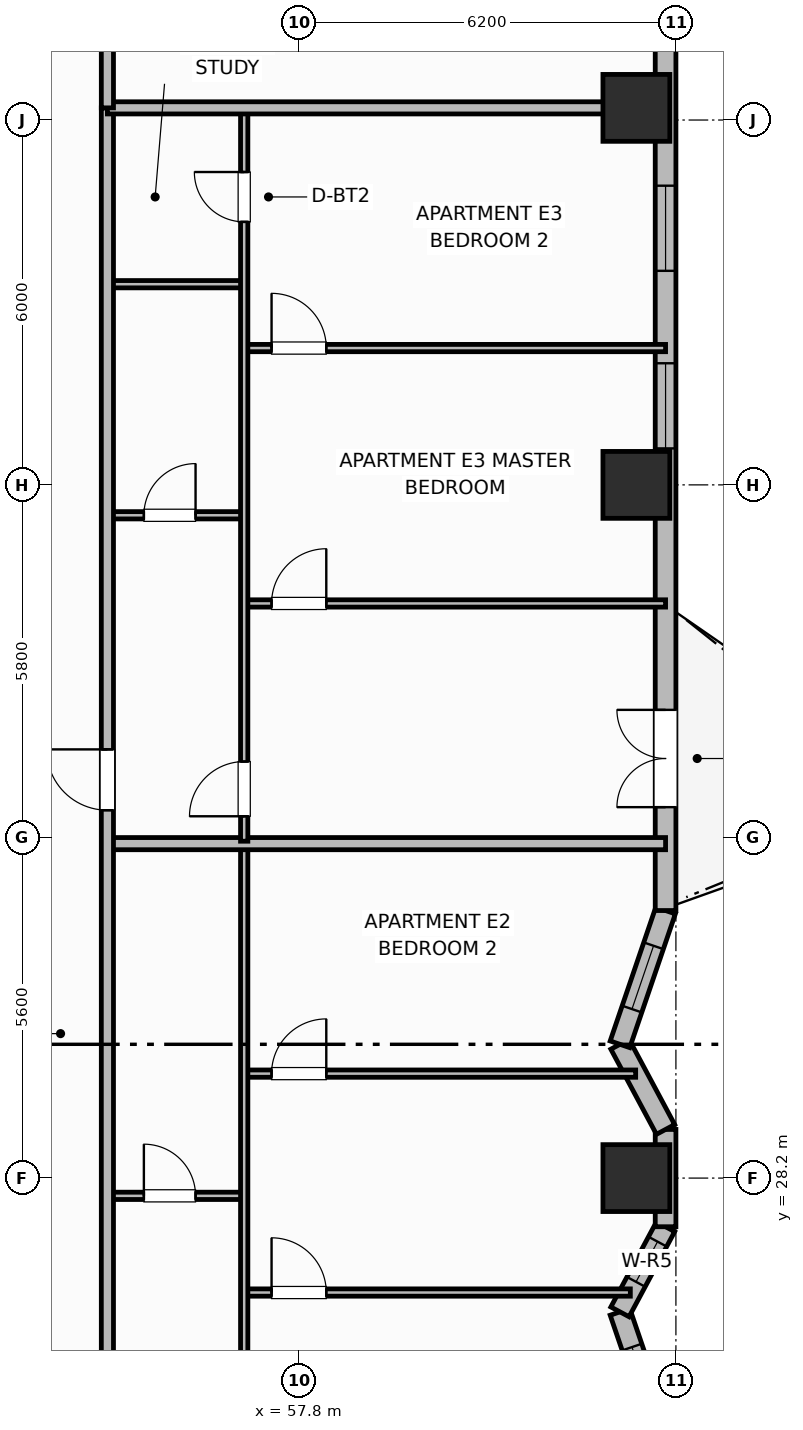
"""IFC4 building model, lengths in metres.
Left out: names, types, materials, properties, quantities, classifications, styles, units other than length and angle.
Written with IfcOpenShell. Run it as: python <this file> out.ifc"""

import sys

from ifc_helpers import new_model, si_unit, direction, frame, frame_2d, origin, origin_2d, place, context, subcontext, project, spatial, rectangle, extrude, element, fill, save


model = new_model("IFC4")
c1 = context("Model", 3, precision=1e-05, world=origin(), true_north=direction((0.0, 1.0)))
c2 = subcontext(c1, "Body", "Model", "MODEL_VIEW")
j1 = project(units=[si_unit("LENGTHUNIT", "METRE"), si_unit("PLANEANGLEUNIT", "RADIAN")], contexts=[c1])
p1 = place(None, origin())
s1 = spatial("IfcSite", under=j1, at=p1, CompositionType="ELEMENT")
p2 = place(p1, origin())
s2 = spatial("IfcBuilding", under=s1, at=p2, CompositionType="ELEMENT")
p3 = place(p2, frame((0.0, 0.0, 121.6)))
s3 = spatial("IfcBuildingStorey", under=s2, at=p3, CompositionType="ELEMENT", Elevation=121.6)
for number, where, z_axis, x_axis in (
    (1, (63.35, 28.2, 0.0), (0.0, 0.0, 1.0), (1.0, 0.0, 0.0)),
    (2, (63.35, 39.6, 0.0), (0.0, 0.0, 1.0), (1.0, 0.0, 0.0)),
    (3, (63.35, 45.8, 0.0), (0.0, 0.0, 1.0), (1.0, 0.0, 0.0)),
):
    element("IfcColumn", number, at=place(p3, frame(where, z_axis=z_axis, x_axis=x_axis)), inside=s3, PredefinedType="COLUMN", context=c2, shape_type="SweptSolid", body=[
        extrude(rectangle(XDim=1.1, YDim=1.1, at=origin_2d()), origin(), (0.0, 0.0, 1.0), 3.7),
    ])
p4 = place(p3, frame((63.83, 23.8, 0.0), z_axis=(0.0, 0.0, 1.0), x_axis=(-0.322680343871, 0.946508000853, 0.0)))
e4 = element("IfcWall", 4, at=p4, inside=s3, PredefinedType="SOLIDWALL", context=c2, shape_type="SweptSolid", body=[
    extrude(rectangle(XDim=2.324, YDim=0.34, at=frame_2d((1.162, 0.0))), origin(), (0.0, 0.0, 1.0), 2.7),
])
p5 = place(p4, frame((0.612, 0.0, 0.89)))
e5 = element("IfcOpeningElement", 5, at=p5, cuts=e4, PredefinedType="OPENING", context=c2, shape_type="SweptSolid", body=[
    extrude(rectangle(XDim=1.1, YDim=1.65, at=frame_2d((0.55, 0.825))), frame((0.0, 0.18, 0.0), z_axis=(0.0, -1.0, 0.0), x_axis=(1.0, 0.0, 0.0)), (0.0, 0.0, 1.0), 0.36),
])
p6 = place(p3, frame((63.08, 26.0, 0.0), z_axis=(0.0, 0.0, 1.0), x_axis=(0.472247007964, 0.881466257703, 0.0)))
e6 = element("IfcWall", 6, at=p6, inside=s3, PredefinedType="SOLIDWALL", context=c2, shape_type="SweptSolid", body=[
    extrude(rectangle(XDim=1.588, YDim=0.34, at=frame_2d((0.794, 0.0))), origin(), (0.0, 0.0, 1.0), 2.7),
])
p7 = place(p6, frame((0.56, 0.0, 0.89)))
e7 = element("IfcOpeningElement", 7, at=p7, cuts=e6, PredefinedType="OPENING", context=c2, shape_type="SweptSolid", body=[
    extrude(rectangle(XDim=0.75, YDim=1.65, at=frame_2d((0.375, 0.825))), frame((0.0, 0.18, 0.0), z_axis=(0.0, -1.0, 0.0), x_axis=(1.0, 0.0, 0.0)), (0.0, 0.0, 1.0), 0.36),
])
p8 = place(p3, frame((63.83, 27.4, 0.0), z_axis=(0.0, 0.0, 1.0), x_axis=(0.0, 1.0, 0.0)))
e8 = element("IfcWall", 8, at=p8, inside=s3, PredefinedType="SOLIDWALL", context=c2, shape_type="SweptSolid", body=[
    extrude(rectangle(XDim=1.6, YDim=0.34, at=frame_2d((0.8, 0.0))), origin(), (0.0, 0.0, 1.0), 2.7),
])
p9 = place(p3, frame((63.83, 29.0, 0.0), z_axis=(0.0, 0.0, 1.0), x_axis=(-0.472247007964, 0.881466257703, 0.0)))
e9 = element("IfcWall", 9, at=p9, inside=s3, PredefinedType="SOLIDWALL", context=c2, shape_type="SweptSolid", body=[
    extrude(rectangle(XDim=1.588, YDim=0.34, at=frame_2d((0.794, 0.0))), origin(), (0.0, 0.0, 1.0), 2.7),
])
p10 = place(p3, frame((63.08, 30.4, 0.0), z_axis=(0.0, 0.0, 1.0), x_axis=(0.32264826586, 0.946518936175, 0.0)))
e10 = element("IfcWall", 10, at=p10, inside=s3, PredefinedType="SOLIDWALL", context=c2, shape_type="SweptSolid", body=[
    extrude(rectangle(XDim=2.324, YDim=0.34, at=frame_2d((1.162, 0.0))), origin(), (0.0, 0.0, 1.0), 2.7),
])
p11 = place(p10, frame((0.612, 0.0, 0.89)))
e11 = element("IfcOpeningElement", 11, at=p11, cuts=e10, PredefinedType="OPENING", context=c2, shape_type="SweptSolid", body=[
    extrude(rectangle(XDim=1.1, YDim=1.65, at=frame_2d((0.55, 0.825))), frame((0.0, 0.18, 0.0), z_axis=(0.0, -1.0, 0.0), x_axis=(1.0, 0.0, 0.0)), (0.0, 0.0, 1.0), 0.36),
])
p12 = place(p3, frame((63.83, 32.6, 0.0), z_axis=(0.0, 0.0, 1.0), x_axis=(0.0, 1.0, 0.0)))
e12 = element("IfcWall", 12, at=p12, inside=s3, PredefinedType="SOLIDWALL", context=c2, shape_type="SweptSolid", body=[
    extrude(rectangle(XDim=14.8, YDim=0.34, at=frame_2d((7.4, 0.0))), origin(), (0.0, 0.0, 1.0), 2.7),
])
p13 = place(p12, frame((1.7, 0.0, 0.0)))
e13 = element("IfcOpeningElement", 13, at=p13, cuts=e12, PredefinedType="OPENING", context=c2, shape_type="SweptSolid", body=[
    extrude(rectangle(XDim=1.6, YDim=2.1, at=frame_2d((0.8, 1.05))), frame((0.0, 0.18, 0.0), z_axis=(0.0, -1.0, 0.0), x_axis=(1.0, 0.0, 0.0)), (0.0, 0.0, 1.0), 0.36),
])
p14 = place(p12, frame((7.6, 0.0, 0.69)))
e14 = element("IfcOpeningElement", 14, at=p14, cuts=e12, PredefinedType="OPENING", context=c2, shape_type="SweptSolid", body=[
    extrude(rectangle(XDim=1.4, YDim=1.85, at=frame_2d((0.7, 0.925))), frame((0.0, 0.18, 0.0), z_axis=(0.0, -1.0, 0.0), x_axis=(1.0, 0.0, 0.0)), (0.0, 0.0, 1.0), 0.36),
])
p15 = place(p12, frame((10.52, 0.0, 0.69)))
e15 = element("IfcOpeningElement", 15, at=p15, cuts=e12, PredefinedType="OPENING", context=c2, shape_type="SweptSolid", body=[
    extrude(rectangle(XDim=1.4, YDim=1.85, at=frame_2d((0.7, 0.925))), frame((0.0, 0.18, 0.0), z_axis=(0.0, -1.0, 0.0), x_axis=(1.0, 0.0, 0.0)), (0.0, 0.0, 1.0), 0.36),
])
p16 = place(p3, frame((54.65, 27.908, 0.0), z_axis=(0.0, 0.0, 1.0), x_axis=(1.0, 0.0, 0.0)))
e16 = element("IfcWall", 16, at=p16, inside=s3, PredefinedType="PARTITIONING", context=c2, shape_type="SweptSolid", body=[
    extrude(rectangle(XDim=2.25, YDim=0.12, at=frame_2d((1.125, 0.0))), origin(), (0.0, 0.0, 1.0), 2.53),
])
p17 = place(p16, frame((0.6, 0.0, 0.0)))
e17 = element("IfcOpeningElement", 17, at=p17, cuts=e16, PredefinedType="OPENING", context=c2, shape_type="SweptSolid", body=[
    extrude(rectangle(XDim=0.85, YDim=2.1, at=frame_2d((0.425, 1.05))), frame((0.0, 0.07, 0.0), z_axis=(0.0, -1.0, 0.0), x_axis=(1.0, 0.0, 0.0)), (0.0, 0.0, 1.0), 0.14),
])
p18 = place(p3, frame((56.9, 26.318, 0.0), z_axis=(0.0, 0.0, 1.0), x_axis=(1.0, 0.0, 0.0)))
e18 = element("IfcWall", 18, at=p18, inside=s3, PredefinedType="PARTITIONING", context=c2, shape_type="SweptSolid", body=[
    extrude(rectangle(XDim=6.351, YDim=0.12, at=frame_2d((3.175, 0.0))), origin(), (0.0, 0.0, 1.0), 2.53),
])
p19 = place(p18, frame((0.45, 0.0, 0.0)))
e19 = element("IfcOpeningElement", 19, at=p19, cuts=e18, PredefinedType="OPENING", context=c2, shape_type="SweptSolid", body=[
    extrude(rectangle(XDim=0.9, YDim=2.1, at=frame_2d((0.45, 1.05))), frame((0.0, 0.07, 0.0), z_axis=(0.0, -1.0, 0.0), x_axis=(1.0, 0.0, 0.0)), (0.0, 0.0, 1.0), 0.14),
])
p20 = place(p3, frame((56.9, 29.918, 0.0), z_axis=(0.0, 0.0, 1.0), x_axis=(1.0, 0.0, 0.0)))
e20 = element("IfcWall", 20, at=p20, inside=s3, PredefinedType="PARTITIONING", context=c2, shape_type="SweptSolid", body=[
    extrude(rectangle(XDim=6.438, YDim=0.12, at=frame_2d((3.219, 0.0))), origin(), (0.0, 0.0, 1.0), 2.53),
])
p21 = place(p20, frame((0.45, 0.0, 0.0)))
e21 = element("IfcOpeningElement", 21, at=p21, cuts=e20, PredefinedType="OPENING", context=c2, shape_type="SweptSolid", body=[
    extrude(rectangle(XDim=0.9, YDim=2.1, at=frame_2d((0.45, 1.05))), frame((0.0, 0.07, 0.0), z_axis=(0.0, -1.0, 0.0), x_axis=(1.0, 0.0, 0.0)), (0.0, 0.0, 1.0), 0.14),
])
p22 = place(p3, frame((56.9, 22.608, 0.0), z_axis=(0.0, 0.0, 1.0), x_axis=(0.0, 1.0, 0.0)))
e22 = element("IfcWall", 22, at=p22, inside=s3, PredefinedType="PARTITIONING", context=c2, shape_type="SweptSolid", body=[
    extrude(rectangle(XDim=11.052, YDim=0.12, at=frame_2d((5.526, 0.0))), origin(), (0.0, 0.0, 1.0), 2.53),
])
p23 = place(p22, frame((0.41, 0.0, 0.0)))
e23 = element("IfcOpeningElement", 23, at=p23, cuts=e22, PredefinedType="OPENING", context=c2, shape_type="SweptSolid", body=[
    extrude(rectangle(XDim=0.9, YDim=2.1, at=frame_2d((0.45, 1.05))), frame((0.0, 0.07, 0.0), z_axis=(0.0, -1.0, 0.0), x_axis=(1.0, 0.0, 0.0)), (0.0, 0.0, 1.0), 0.14),
])
p24 = place(p3, frame((54.65, 33.7, 0.0), z_axis=(0.0, 0.0, 1.0), x_axis=(1.0, 0.0, 0.0)))
e24 = element("IfcWall", 24, at=p24, inside=s3, PredefinedType="PARTITIONING", context=c2, shape_type="SweptSolid", body=[
    extrude(rectangle(XDim=9.18, YDim=0.2, at=frame_2d((4.59, 0.0))), origin(), (0.0, 0.0, 1.0), 2.53),
])
p25 = place(p3, frame((54.65, 39.1, 0.0), z_axis=(0.0, 0.0, 1.0), x_axis=(1.0, 0.0, 0.0)))
e25 = element("IfcWall", 25, at=p25, inside=s3, PredefinedType="PARTITIONING", context=c2, shape_type="SweptSolid", body=[
    extrude(rectangle(XDim=2.25, YDim=0.12, at=frame_2d((1.125, 0.0))), origin(), (0.0, 0.0, 1.0), 2.53),
])
p26 = place(p25, frame((0.6, 0.0, 0.0)))
e26 = element("IfcOpeningElement", 26, at=p26, cuts=e25, PredefinedType="OPENING", context=c2, shape_type="SweptSolid", body=[
    extrude(rectangle(XDim=0.85, YDim=2.1, at=frame_2d((0.425, 1.05))), frame((0.0, 0.07, 0.0), z_axis=(0.0, -1.0, 0.0), x_axis=(1.0, 0.0, 0.0)), (0.0, 0.0, 1.0), 0.14),
])
p27 = place(p3, frame((54.65, 42.9, 0.0), z_axis=(0.0, 0.0, 1.0), x_axis=(1.0, 0.0, 0.0)))
e27 = element("IfcWall", 27, at=p27, inside=s3, PredefinedType="PARTITIONING", context=c2, shape_type="SweptSolid", body=[
    extrude(rectangle(XDim=2.25, YDim=0.12, at=frame_2d((1.125, 0.0))), origin(), (0.0, 0.0, 1.0), 2.53),
])
p28 = place(p3, frame((56.9, 37.65, 0.0), z_axis=(0.0, 0.0, 1.0), x_axis=(1.0, 0.0, 0.0)))
e28 = element("IfcWall", 28, at=p28, inside=s3, PredefinedType="PARTITIONING", context=c2, shape_type="SweptSolid", body=[
    extrude(rectangle(XDim=6.93, YDim=0.12, at=frame_2d((3.465, 0.0))), origin(), (0.0, 0.0, 1.0), 2.53),
])
p29 = place(p28, frame((0.45, 0.0, 0.0)))
e29 = element("IfcOpeningElement", 29, at=p29, cuts=e28, PredefinedType="OPENING", context=c2, shape_type="SweptSolid", body=[
    extrude(rectangle(XDim=0.9, YDim=2.1, at=frame_2d((0.45, 1.05))), frame((0.0, 0.07, 0.0), z_axis=(0.0, -1.0, 0.0), x_axis=(1.0, 0.0, 0.0)), (0.0, 0.0, 1.0), 0.14),
])
p30 = place(p3, frame((56.9, 41.85, 0.0), z_axis=(0.0, 0.0, 1.0), x_axis=(1.0, 0.0, 0.0)))
e30 = element("IfcWall", 30, at=p30, inside=s3, PredefinedType="PARTITIONING", context=c2, shape_type="SweptSolid", body=[
    extrude(rectangle(XDim=6.93, YDim=0.12, at=frame_2d((3.465, 0.0))), origin(), (0.0, 0.0, 1.0), 2.53),
])
p31 = place(p30, frame((0.45, 0.0, 0.0)))
e31 = element("IfcOpeningElement", 31, at=p31, cuts=e30, PredefinedType="OPENING", context=c2, shape_type="SweptSolid", body=[
    extrude(rectangle(XDim=0.9, YDim=2.1, at=frame_2d((0.45, 1.05))), frame((0.0, 0.07, 0.0), z_axis=(0.0, -1.0, 0.0), x_axis=(1.0, 0.0, 0.0)), (0.0, 0.0, 1.0), 0.14),
])
p32 = place(p3, frame((56.9, 33.74, 0.0), z_axis=(0.0, 0.0, 1.0), x_axis=(0.0, 1.0, 0.0)))
e32 = element("IfcWall", 32, at=p32, inside=s3, PredefinedType="PARTITIONING", context=c2, shape_type="SweptSolid", body=[
    extrude(rectangle(XDim=12.02, YDim=0.12, at=frame_2d((6.01, 0.0))), origin(), (0.0, 0.0, 1.0), 2.53),
])
p33 = place(p32, frame((0.41, 0.0, 0.0)))
e33 = element("IfcOpeningElement", 33, at=p33, cuts=e32, PredefinedType="OPENING", context=c2, shape_type="SweptSolid", body=[
    extrude(rectangle(XDim=0.9, YDim=2.1, at=frame_2d((0.45, 1.05))), frame((0.0, 0.07, 0.0), z_axis=(0.0, -1.0, 0.0), x_axis=(1.0, 0.0, 0.0)), (0.0, 0.0, 1.0), 0.14),
])
p34 = place(p32, frame((10.185, 0.0, 0.0)))
e34 = element("IfcOpeningElement", 34, at=p34, cuts=e32, PredefinedType="OPENING", context=c2, shape_type="SweptSolid", body=[
    extrude(rectangle(XDim=0.82, YDim=2.08, at=frame_2d((0.41, 1.04))), frame((0.0, 0.07, 0.0), z_axis=(0.0, -1.0, 0.0), x_axis=(1.0, 0.0, 0.0)), (0.0, 0.0, 1.0), 0.14),
])
p35 = place(p3, frame((54.65, 10.6, 0.0), z_axis=(0.0, 0.0, 1.0), x_axis=(0.0, 1.0, 0.0)))
e35 = element("IfcWall", 35, at=p35, inside=s3, PredefinedType="PARTITIONING", context=c2, shape_type="SweptSolid", body=[
    extrude(rectangle(XDim=35.2, YDim=0.2, at=frame_2d((17.6, 0.0))), origin(), (0.0, 0.0, 1.0), 2.53),
])
p36 = place(p35, frame((2.65, 0.0, 0.0)))
e36 = element("IfcOpeningElement", 36, at=p36, cuts=e35, PredefinedType="OPENING", context=c2, shape_type="SweptSolid", body=[
    extrude(rectangle(XDim=1.0, YDim=2.15, at=frame_2d((0.5, 1.075))), frame((0.0, 0.11, 0.0), z_axis=(0.0, -1.0, 0.0), x_axis=(1.0, 0.0, 0.0)), (0.0, 0.0, 1.0), 0.22),
])
p37 = place(p35, frame((12.518, 0.0, 0.0)))
e37 = element("IfcOpeningElement", 37, at=p37, cuts=e35, PredefinedType="OPENING", context=c2, shape_type="SweptSolid", body=[
    extrude(rectangle(XDim=1.0, YDim=2.15, at=frame_2d((0.5, 1.075))), frame((0.0, 0.11, 0.0), z_axis=(0.0, -1.0, 0.0), x_axis=(1.0, 0.0, 0.0)), (0.0, 0.0, 1.0), 0.22),
])
p38 = place(p35, frame((23.65, 0.0, 0.0)))
e38 = element("IfcOpeningElement", 38, at=p38, cuts=e35, PredefinedType="OPENING", context=c2, shape_type="SweptSolid", body=[
    extrude(rectangle(XDim=1.0, YDim=2.15, at=frame_2d((0.5, 1.075))), frame((0.0, 0.11, 0.0), z_axis=(0.0, -1.0, 0.0), x_axis=(1.0, 0.0, 0.0)), (0.0, 0.0, 1.0), 0.22),
])
p39 = place(p3, frame((54.65, 45.8, 0.0), z_axis=(0.0, 0.0, 1.0), x_axis=(1.0, 0.0, 0.0)))
e39 = element("IfcWall", 39, at=p39, inside=s3, PredefinedType="PARTITIONING", context=c2, shape_type="SweptSolid", body=[
    extrude(rectangle(XDim=8.76, YDim=0.2, at=frame_2d((4.38, 0.0))), origin(), (0.0, 0.0, 1.0), 2.53),
])
p40 = place(p3, frame((54.65, 45.8, 0.0), z_axis=(0.0, 0.0, 1.0), x_axis=(0.0, 1.0, 0.0)))
e40 = element("IfcWall", 40, at=p40, inside=s3, PredefinedType="PARTITIONING", context=c2, shape_type="SweptSolid", body=[
    extrude(rectangle(XDim=5.63, YDim=0.2, at=frame_2d((2.815, 0.0))), origin(), (0.0, 0.0, 1.0), 2.53),
])
p41 = place(p5, origin())
e41 = element("IfcWindow", 41, at=p41, inside=s3, PartitioningType="SINGLE_PANEL", PredefinedType="WINDOW", context=c2, shape_type="SweptSolid", body=[
    extrude(rectangle(XDim=1.1, YDim=1.65, at=frame_2d((0.55, 0.825))), frame((0.0, 0.03, 0.0), z_axis=(0.0, -1.0, 0.0), x_axis=(1.0, 0.0, 0.0)), (0.0, 0.0, 1.0), 0.06),
])
fill(e5, e41)
p42 = place(p7, origin())
e42 = element("IfcWindow", 42, at=p42, inside=s3, PartitioningType="SINGLE_PANEL", PredefinedType="WINDOW", context=c2, shape_type="SweptSolid", body=[
    extrude(rectangle(XDim=0.75, YDim=1.65, at=frame_2d((0.375, 0.825))), frame((0.0, 0.03, 0.0), z_axis=(0.0, -1.0, 0.0), x_axis=(1.0, 0.0, 0.0)), (0.0, 0.0, 1.0), 0.06),
])
fill(e7, e42)
p43 = place(p11, origin())
e43 = element("IfcWindow", 43, at=p43, inside=s3, PartitioningType="SINGLE_PANEL", PredefinedType="WINDOW", context=c2, shape_type="SweptSolid", body=[
    extrude(rectangle(XDim=1.1, YDim=1.65, at=frame_2d((0.55, 0.825))), frame((0.0, 0.03, 0.0), z_axis=(0.0, -1.0, 0.0), x_axis=(1.0, 0.0, 0.0)), (0.0, 0.0, 1.0), 0.06),
])
fill(e11, e43)
p44 = place(p13, origin())
e44 = element("IfcDoor", 44, at=p44, inside=s3, OperationType="DOUBLE_DOOR_SINGLE_SWING", PredefinedType="DOOR", context=c2, shape_type="SweptSolid", body=[
    extrude(rectangle(XDim=1.6, YDim=2.1, at=frame_2d((0.8, 1.05))), frame((0.0, 0.025, 0.0), z_axis=(0.0, -1.0, 0.0), x_axis=(1.0, 0.0, 0.0)), (0.0, 0.0, 1.0), 0.05),
])
fill(e13, e44)
p45 = place(p14, origin())
e45 = element("IfcWindow", 45, at=p45, inside=s3, PartitioningType="SINGLE_PANEL", PredefinedType="WINDOW", context=c2, shape_type="SweptSolid", body=[
    extrude(rectangle(XDim=1.4, YDim=1.85, at=frame_2d((0.7, 0.925))), frame((0.0, 0.03, 0.0), z_axis=(0.0, -1.0, 0.0), x_axis=(1.0, 0.0, 0.0)), (0.0, 0.0, 1.0), 0.06),
])
fill(e14, e45)
p46 = place(p15, origin())
e46 = element("IfcWindow", 46, at=p46, inside=s3, PartitioningType="SINGLE_PANEL", PredefinedType="WINDOW", context=c2, shape_type="SweptSolid", body=[
    extrude(rectangle(XDim=1.4, YDim=1.85, at=frame_2d((0.7, 0.925))), frame((0.0, 0.03, 0.0), z_axis=(0.0, -1.0, 0.0), x_axis=(1.0, 0.0, 0.0)), (0.0, 0.0, 1.0), 0.06),
])
fill(e15, e46)
p47 = place(p17, origin())
e47 = element("IfcDoor", 47, at=p47, inside=s3, OperationType="SINGLE_SWING_LEFT", PredefinedType="DOOR", context=c2, shape_type="SweptSolid", body=[
    extrude(rectangle(XDim=0.85, YDim=2.1, at=frame_2d((0.425, 1.05))), frame((0.0, 0.025, 0.0), z_axis=(0.0, -1.0, 0.0), x_axis=(1.0, 0.0, 0.0)), (0.0, 0.0, 1.0), 0.05),
])
fill(e17, e47)
p48 = place(p19, origin())
e48 = element("IfcDoor", 48, at=p48, inside=s3, OperationType="SINGLE_SWING_LEFT", PredefinedType="DOOR", context=c2, shape_type="SweptSolid", body=[
    extrude(rectangle(XDim=0.9, YDim=2.1, at=frame_2d((0.45, 1.05))), frame((0.0, 0.025, 0.0), z_axis=(0.0, -1.0, 0.0), x_axis=(1.0, 0.0, 0.0)), (0.0, 0.0, 1.0), 0.05),
])
fill(e19, e48)
p49 = place(p21, origin())
e49 = element("IfcDoor", 49, at=p49, inside=s3, OperationType="SINGLE_SWING_RIGHT", PredefinedType="DOOR", context=c2, shape_type="SweptSolid", body=[
    extrude(rectangle(XDim=0.9, YDim=2.1, at=frame_2d((0.45, 1.05))), frame((0.0, 0.025, 0.0), z_axis=(0.0, -1.0, 0.0), x_axis=(1.0, 0.0, 0.0)), (0.0, 0.0, 1.0), 0.05),
])
fill(e21, e49)
p50 = place(p26, origin())
e50 = element("IfcDoor", 50, at=p50, inside=s3, OperationType="SINGLE_SWING_RIGHT", PredefinedType="DOOR", context=c2, shape_type="SweptSolid", body=[
    extrude(rectangle(XDim=0.85, YDim=2.1, at=frame_2d((0.425, 1.05))), frame((0.0, 0.025, 0.0), z_axis=(0.0, -1.0, 0.0), x_axis=(1.0, 0.0, 0.0)), (0.0, 0.0, 1.0), 0.05),
])
fill(e26, e50)
p51 = place(p29, origin())
e51 = element("IfcDoor", 51, at=p51, inside=s3, OperationType="SINGLE_SWING_RIGHT", PredefinedType="DOOR", context=c2, shape_type="SweptSolid", body=[
    extrude(rectangle(XDim=0.9, YDim=2.1, at=frame_2d((0.45, 1.05))), frame((0.0, 0.025, 0.0), z_axis=(0.0, -1.0, 0.0), x_axis=(1.0, 0.0, 0.0)), (0.0, 0.0, 1.0), 0.05),
])
fill(e29, e51)
p52 = place(p31, origin())
e52 = element("IfcDoor", 52, at=p52, inside=s3, OperationType="SINGLE_SWING_LEFT", PredefinedType="DOOR", context=c2, shape_type="SweptSolid", body=[
    extrude(rectangle(XDim=0.9, YDim=2.1, at=frame_2d((0.45, 1.05))), frame((0.0, 0.025, 0.0), z_axis=(0.0, -1.0, 0.0), x_axis=(1.0, 0.0, 0.0)), (0.0, 0.0, 1.0), 0.05),
])
fill(e31, e52)
p53 = place(p33, origin())
e53 = element("IfcDoor", 53, at=p53, inside=s3, OperationType="SINGLE_SWING_LEFT", PredefinedType="DOOR", context=c2, shape_type="SweptSolid", body=[
    extrude(rectangle(XDim=0.9, YDim=2.1, at=frame_2d((0.45, 1.05))), frame((0.0, 0.025, 0.0), z_axis=(0.0, -1.0, 0.0), x_axis=(1.0, 0.0, 0.0)), (0.0, 0.0, 1.0), 0.05),
])
fill(e33, e53)
p54 = place(p34, origin())
e54 = element("IfcDoor", 54, at=p54, inside=s3, OperationType="SINGLE_SWING_RIGHT", PredefinedType="DOOR", context=c2, shape_type="SweptSolid", body=[
    extrude(rectangle(XDim=0.82, YDim=2.08, at=frame_2d((0.41, 1.04))), frame((0.0, 0.025, 0.0), z_axis=(0.0, -1.0, 0.0), x_axis=(1.0, 0.0, 0.0)), (0.0, 0.0, 1.0), 0.05),
])
fill(e34, e54)
p55 = place(p38, origin())
e55 = element("IfcDoor", 55, at=p55, inside=s3, OperationType="SINGLE_SWING_RIGHT", PredefinedType="DOOR", context=c2, shape_type="SweptSolid", body=[
    extrude(rectangle(XDim=1.0, YDim=2.15, at=frame_2d((0.5, 1.075))), frame((0.0, 0.025, 0.0), z_axis=(0.0, -1.0, 0.0), x_axis=(1.0, 0.0, 0.0)), (0.0, 0.0, 1.0), 0.05),
])
fill(e38, e55)
save(model, sys.argv[1])
